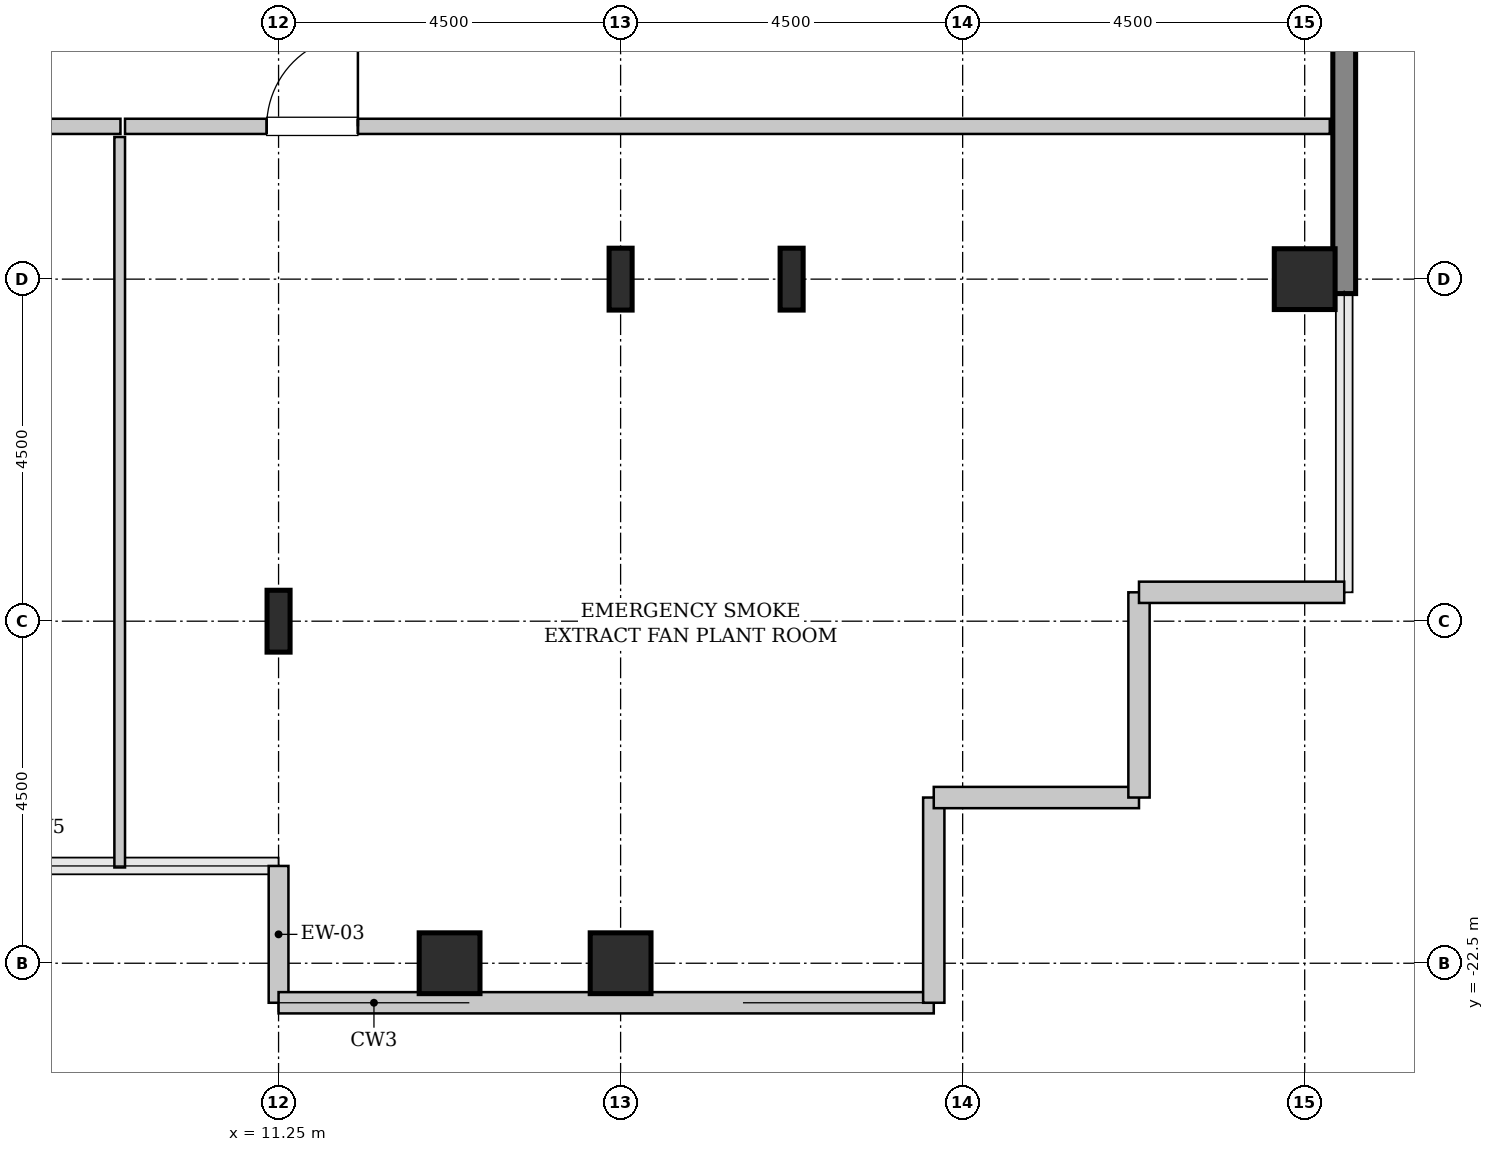
"""IFC4 building model, lengths in metres.
Left out: names, types, materials, properties, quantities, classifications, styles, units other than length and angle.
Written with IfcOpenShell. Run it as: python <this file> out.ifc"""

import sys

from ifc_helpers import new_model, si_unit, direction, frame, frame_2d, origin, origin_2d, place, context, subcontext, project, spatial, rectangle, hollow_rectangle, i_section, extrude, source, transform, mapped, element, fill, save


model = new_model("IFC4")
c1 = context("Model", 3, precision=1e-05, world=origin(), true_north=direction((0.0, 1.0)))
c2 = subcontext(c1, "Body", "Model", "MODEL_VIEW")
j1 = project(units=[si_unit("LENGTHUNIT", "METRE"), si_unit("PLANEANGLEUNIT", "RADIAN")], contexts=[c1])
p1 = place(None, origin())
s1 = spatial("IfcSite", under=j1, at=p1, CompositionType="ELEMENT")
p2 = place(p1, origin())
s2 = spatial("IfcBuilding", under=s1, at=p2, CompositionType="ELEMENT")
p3 = place(p2, frame((0.0, 0.0, 202.0)))
s3 = spatial("IfcBuildingStorey", under=s2, at=p3, CompositionType="ELEMENT", Elevation=202.0)
m1 = source(origin(), c2, "Body", "SweptSolid", [
    extrude(i_section(OverallWidth=0.303, OverallDepth=0.814, WebThickness=0.021, FlangeThickness=0.04, FilletRadius=0.03, at=origin_2d()), origin(), (0.0, 0.0, 1.0), 4.6),
])
p4 = place(p3, frame((11.25, -18.0, 0.0), z_axis=(0.0, 0.0, 1.0), x_axis=(1.0, 0.0, 0.0)))
e1 = element("IfcColumn", 1, at=p4, inside=s3, PredefinedType="COLUMN", context=c2, shape_type="MappedRepresentation", body=[
    mapped(m1, transform((0.0, 0.0, 0.0), x_axis=(1.0, 0.0, 0.0), y_axis=(0.0, 1.0, 0.0), z_axis=(0.0, 0.0, 1.0), scale=1.0)),
])
m2 = source(origin(), c2, "Body", "SweptSolid", [
    extrude(hollow_rectangle(XDim=0.8, YDim=0.8, WallThickness=0.04, InnerFilletRadius=0.04, OuterFilletRadius=0.08, at=origin_2d()), origin(), (0.0, 0.0, 1.0), 4.6),
])
for number, where, z_axis, x_axis in (
    (2, (13.5, -22.5, 0.0), (0.0, 0.0, 1.0), (1.0, 0.0, 0.0)),
    (3, (15.75, -22.5, 0.0), (0.0, 0.0, 1.0), (1.0, 0.0, 0.0)),
):
    element("IfcColumn", number, at=place(p3, frame(where, z_axis=z_axis, x_axis=x_axis)), inside=s3, PredefinedType="COLUMN", context=c2, shape_type="MappedRepresentation", body=[
        mapped(m2, transform((0.0, 0.0, 0.0), x_axis=(1.0, 0.0, 0.0), y_axis=(0.0, 1.0, 0.0), z_axis=(0.0, 0.0, 1.0), scale=1.0)),
    ])
for number, where, z_axis, x_axis in (
    (4, (15.75, -13.5, 0.0), (0.0, 0.0, 1.0), (1.0, 0.0, 0.0)),
    (5, (18.0, -13.5, 0.0), (0.0, 0.0, 1.0), (1.0, 0.0, 0.0)),
):
    element("IfcColumn", number, at=place(p3, frame(where, z_axis=z_axis, x_axis=x_axis)), inside=s3, PredefinedType="COLUMN", context=c2, shape_type="MappedRepresentation", body=[
        mapped(m1, transform((0.0, 0.0, 0.0), x_axis=(1.0, 0.0, 0.0), y_axis=(0.0, 1.0, 0.0), z_axis=(0.0, 0.0, 1.0), scale=1.0)),
    ])
p5 = place(p3, frame((24.75, -13.5, 0.0), z_axis=(0.0, 0.0, 1.0), x_axis=(1.0, 0.0, 0.0)))
e6 = element("IfcColumn", 6, at=p5, inside=s3, PredefinedType="COLUMN", context=c2, shape_type="MappedRepresentation", body=[
    mapped(m2, transform((0.0, 0.0, 0.0), x_axis=(1.0, 0.0, 0.0), y_axis=(0.0, 1.0, 0.0), z_axis=(0.0, 0.0, 1.0), scale=1.0)),
])
m3 = source(origin(), c2, "Body", "SweptSolid", [
    extrude(rectangle(XDim=9.38, YDim=0.3, at=frame_2d((4.69, 0.0))), origin(), (0.0, 0.0, 1.0), 4.35),
])
p6 = place(p3, frame((25.27, -13.69, 0.0), z_axis=(0.0, 0.0, 1.0), x_axis=(0.0, 1.0, 0.0)))
e7 = element("IfcWall", 7, at=p6, inside=s3, PredefinedType="SHEAR", context=c2, shape_type="MappedRepresentation", body=[
    mapped(m3, transform((0.0, 0.0, 0.0), x_axis=(1.0, 0.0, 0.0), y_axis=(0.0, 1.0, 0.0), z_axis=(0.0, 0.0, 1.0), scale=1.0)),
])
m4 = source(origin(), c2, "Body", "SweptSolid", [
    extrude(rectangle(XDim=1.8, YDim=0.26, at=frame_2d((0.9, 0.0))), origin(), (0.0, 0.0, 1.0), 4.35),
])
p7 = place(p3, frame((11.25, -21.22, 0.0), z_axis=(0.0, 0.0, 1.0), x_axis=(0.0, -1.0, 0.0)))
e8 = element("IfcWall", 8, at=p7, inside=s3, PredefinedType="SOLIDWALL", context=c2, shape_type="MappedRepresentation", body=[
    mapped(m4, transform((0.0, 0.0, 0.0), x_axis=(1.0, 0.0, 0.0), y_axis=(0.0, 1.0, 0.0), z_axis=(0.0, 0.0, 1.0), scale=1.0)),
])
m5 = source(origin(), c2, "Body", "SweptSolid", [
    extrude(rectangle(XDim=8.62, YDim=0.28, at=frame_2d((4.31, 0.0))), origin(), (0.0, 0.0, 1.0), 1.1),
])
p8 = place(p3, frame((11.25, -23.02, 0.0), z_axis=(0.0, 0.0, 1.0), x_axis=(1.0, 0.0, 0.0)))
e9 = element("IfcWall", 9, at=p8, inside=s3, PredefinedType="SOLIDWALL", context=c2, shape_type="MappedRepresentation", body=[
    mapped(m5, transform((0.0, 0.0, 0.0), x_axis=(1.0, 0.0, 0.0), y_axis=(0.0, 1.0, 0.0), z_axis=(0.0, 0.0, 1.0), scale=1.0)),
])
m6 = source(origin(), c2, "Body", "SweptSolid", [
    extrude(rectangle(XDim=2.7, YDim=0.28, at=frame_2d((1.35, 0.0))), origin(), (0.0, 0.0, 1.0), 4.35),
])
for number, where, z_axis, x_axis in (
    (10, (19.87, -23.02, 0.0), (0.0, 0.0, 1.0), (0.0, 1.0, 0.0)),
    (11, (19.87, -20.32, 0.0), (0.0, 0.0, 1.0), (1.0, 0.0, 0.0)),
    (12, (22.57, -20.32, 0.0), (0.0, 0.0, 1.0), (0.0, 1.0, 0.0)),
    (13, (22.57, -17.62, 0.0), (0.0, 0.0, 1.0), (1.0, 0.0, 0.0)),
):
    element("IfcWall", number, at=place(p3, frame(where, z_axis=z_axis, x_axis=x_axis)), inside=s3, PredefinedType="SOLIDWALL", context=c2, shape_type="MappedRepresentation", body=[
        mapped(m6, transform((0.0, 0.0, 0.0), x_axis=(1.0, 0.0, 0.0), y_axis=(0.0, 1.0, 0.0), z_axis=(0.0, 0.0, 1.0), scale=1.0)),
    ])
m7 = source(origin(), c2, "Body", "SweptSolid", [
    extrude(rectangle(XDim=4.54, YDim=0.2, at=frame_2d((2.27, 0.0))), origin(), (0.0, 0.0, 1.0), 4.335),
])
p9 = place(p3, frame((4.63, -11.49, 0.0), z_axis=(0.0, 0.0, 1.0), x_axis=(1.0, 0.0, 0.0)))
e14 = element("IfcWall", 14, at=p9, inside=s3, PredefinedType="SOLIDWALL", context=c2, shape_type="MappedRepresentation", body=[
    mapped(m7, transform((0.0, 0.0, 0.0), x_axis=(1.0, 0.0, 0.0), y_axis=(0.0, 1.0, 0.0), z_axis=(0.0, 0.0, 1.0), scale=1.0)),
])
p10 = place(p9, frame((1.67, 0.0, 0.0)))
e15 = element("IfcOpeningElement", 15, at=p10, cuts=e14, PredefinedType="OPENING", context=c2, shape_type="SweptSolid", body=[
    extrude(rectangle(XDim=1.2, YDim=2.15, at=frame_2d((0.6, 1.075))), frame((0.0, 0.11, 0.0), z_axis=(0.0, -1.0, 0.0), x_axis=(1.0, 0.0, 0.0)), (0.0, 0.0, 1.0), 0.22),
])
m8 = source(origin(), c2, "Body", "SweptSolid", [
    extrude(rectangle(XDim=9.61, YDim=0.14, at=frame_2d((4.805, 0.0))), origin(), (0.0, 0.0, 1.0), 4.335),
])
p11 = place(p3, frame((9.16, -21.24, 0.0), z_axis=(0.0, 0.0, 1.0), x_axis=(0.0, 1.0, 0.0)))
e16 = element("IfcWall", 16, at=p11, inside=s3, PredefinedType="PARTITIONING", context=c2, shape_type="MappedRepresentation", body=[
    mapped(m8, transform((0.0, 0.0, 0.0), x_axis=(1.0, 0.0, 0.0), y_axis=(0.0, 1.0, 0.0), z_axis=(0.0, 0.0, 1.0), scale=1.0)),
])
m9 = source(origin(), c2, "Body", "SweptSolid", [
    extrude(rectangle(XDim=15.85, YDim=0.2, at=frame_2d((7.925, 0.0))), origin(), (0.0, 0.0, 1.0), 4.335),
])
p12 = place(p3, frame((9.23, -11.49, 0.0), z_axis=(0.0, 0.0, 1.0), x_axis=(1.0, 0.0, 0.0)))
e17 = element("IfcWall", 17, at=p12, inside=s3, PredefinedType="SOLIDWALL", context=c2, shape_type="MappedRepresentation", body=[
    mapped(m9, transform((0.0, 0.0, 0.0), x_axis=(1.0, 0.0, 0.0), y_axis=(0.0, 1.0, 0.0), z_axis=(0.0, 0.0, 1.0), scale=1.0)),
])
p13 = place(p12, frame((1.864, 0.0, 0.0)))
e18 = element("IfcOpeningElement", 18, at=p13, cuts=e17, PredefinedType="OPENING", context=c2, shape_type="SweptSolid", body=[
    extrude(rectangle(XDim=1.2, YDim=2.15, at=frame_2d((0.6, 1.075))), frame((0.0, 0.11, 0.0), z_axis=(0.0, -1.0, 0.0), x_axis=(1.0, 0.0, 0.0)), (0.0, 0.0, 1.0), 0.22),
])
m10 = source(origin(), c2, "Body", "SweptSolid", [
    extrude(rectangle(XDim=1.2, YDim=2.15, at=frame_2d((0.6, 1.075))), frame((0.0, 0.025, 0.0), z_axis=(0.0, -1.0, 0.0), x_axis=(1.0, 0.0, 0.0)), (0.0, 0.0, 1.0), 0.05),
])
p14 = place(p13, origin())
e19 = element("IfcDoor", 19, at=p14, inside=s3, OperationType="SINGLE_SWING_RIGHT", PredefinedType="DOOR", context=c2, shape_type="MappedRepresentation", body=[
    mapped(m10, transform((0.0, 0.0, 0.0), x_axis=(1.0, 0.0, 0.0), y_axis=(0.0, 1.0, 0.0), z_axis=(0.0, 0.0, 1.0), scale=1.0)),
])
fill(e18, e19)
save(model, sys.argv[1])
